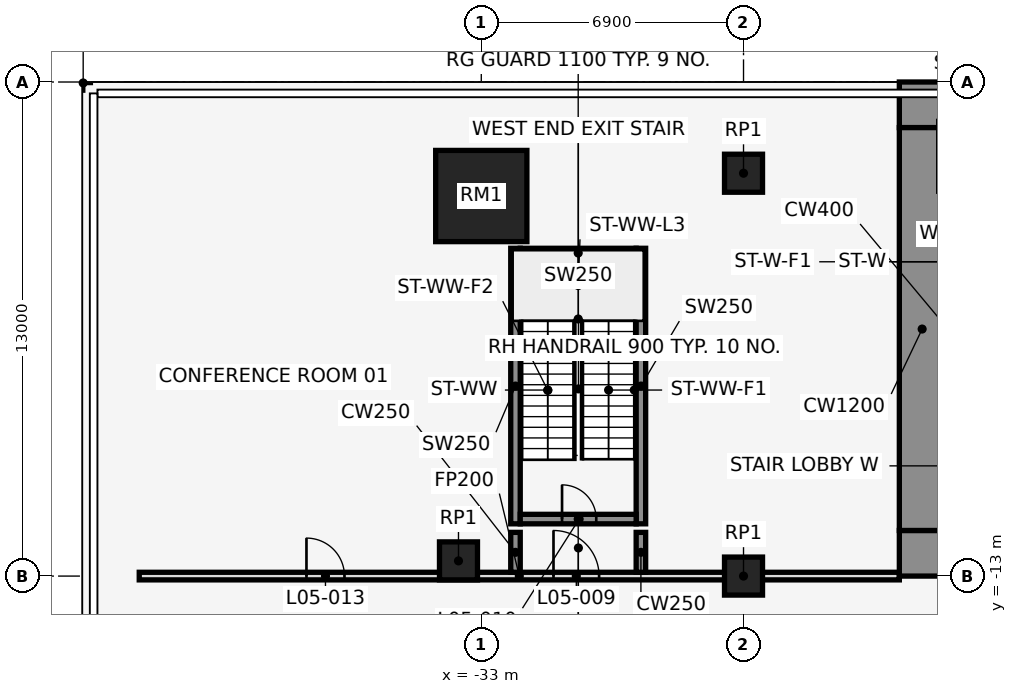
"""IFC4 building model, lengths in metres.
Left out: names, types, materials, properties, quantities, classifications, styles, units other than length and angle.
Written with IfcOpenShell. Run it as: python <this file> out.ifc"""

import sys

from ifc_helpers import new_model, si_unit, direction, frame, frame_2d, origin, origin_2d, place, context, subcontext, project, spatial, rectangle, extrude, element, fill, save


model = new_model("IFC4")
c1 = context("Model", 3, precision=1e-05, world=origin(), true_north=direction((0.0, 1.0)))
c2 = subcontext(c1, "Body", "Model", "MODEL_VIEW")
j1 = project(units=[si_unit("LENGTHUNIT", "METRE"), si_unit("PLANEANGLEUNIT", "RADIAN")], contexts=[c1])
p1 = place(None, origin())
s1 = spatial("IfcSite", under=j1, at=p1, CompositionType="ELEMENT")
p2 = place(p1, origin())
s2 = spatial("IfcBuilding", under=s1, at=p2, CompositionType="ELEMENT")
p3 = place(p2, frame((0.0, 0.0, 30.0)))
s3 = spatial("IfcBuildingStorey", under=s2, at=p3, CompositionType="ELEMENT", Elevation=30.0)
p4 = place(p3, frame((-33.0, -3.0, 0.0), z_axis=(0.0, 0.0, 1.0), x_axis=(1.0, 0.0, 0.0)))
e1 = element("IfcColumn", 1, at=p4, inside=s3, PredefinedType="COLUMN", context=c2, shape_type="SweptSolid", body=[
    extrude(rectangle(XDim=2.4, YDim=2.4, at=origin_2d()), origin(), (0.0, 0.0, 1.0), 5.0),
])
for number, where, z_axis, x_axis in (
    (2, (-26.1, -2.4, 0.0), (0.0, 0.0, 1.0), (1.0, 0.0, 0.0)),
    (3, (-33.6, -12.6, 0.0), (0.0, 0.0, 1.0), (1.0, 0.0, 0.0)),
    (4, (-26.1, -13.0, 0.0), (0.0, 0.0, 1.0), (1.0, 0.0, 0.0)),
):
    element("IfcColumn", number, at=place(p3, frame(where, z_axis=z_axis, x_axis=x_axis)), inside=s3, PredefinedType="COLUMN", context=c2, shape_type="SweptSolid", body=[
        extrude(rectangle(XDim=1.0, YDim=1.0, at=origin_2d()), origin(), (0.0, 0.0, 1.0), 5.0),
    ])
for number, where, z_axis, x_axis in (
    (5, (-32.1, -11.625, 0.0), (0.0, 0.0, 1.0), (0.0, 1.0, 0.0)),
    (6, (-28.8, -11.625, 0.0), (0.0, 0.0, 1.0), (0.0, 1.0, 0.0)),
):
    element("IfcWall", number, at=place(p3, frame(where, z_axis=z_axis, x_axis=x_axis)), inside=s3, PredefinedType="SHEAR", context=c2, shape_type="SweptSolid", body=[
        extrude(rectangle(XDim=7.25, YDim=0.25, at=frame_2d((3.625, 0.0))), origin(), (0.0, 0.0, 1.0), 5.0),
    ])
p5 = place(p3, frame((-31.975, -11.5, 0.0), z_axis=(0.0, 0.0, 1.0), x_axis=(1.0, 0.0, 0.0)))
e7 = element("IfcWall", 7, at=p5, inside=s3, PredefinedType="SHEAR", context=c2, shape_type="SweptSolid", body=[
    extrude(rectangle(XDim=3.05, YDim=0.25, at=frame_2d((1.525, 0.0))), origin(), (0.0, 0.0, 1.0), 5.0),
])
p6 = place(p5, frame((1.1, 0.0, 0.0)))
e8 = element("IfcOpeningElement", 8, at=p6, cuts=e7, PredefinedType="OPENING", context=c2, shape_type="SweptSolid", body=[
    extrude(rectangle(XDim=0.9, YDim=2.1, at=frame_2d((0.45, 1.05))), frame((0.0, 0.137, 0.0), z_axis=(0.0, -1.0, 0.0), x_axis=(1.0, 0.0, 0.0)), (0.0, 0.0, 1.0), 0.274),
])
p7 = place(p3, frame((-31.975, -4.5, 0.0), z_axis=(0.0, 0.0, 1.0), x_axis=(1.0, 0.0, 0.0)))
e9 = element("IfcWall", 9, at=p7, inside=s3, PredefinedType="SHEAR", context=c2, shape_type="SweptSolid", body=[
    extrude(rectangle(XDim=3.05, YDim=0.25, at=frame_2d((1.525, 0.0))), origin(), (0.0, 0.0, 1.0), 5.0),
])
p8 = place(p3, frame((-42.0, -13.0, 0.0), z_axis=(0.0, 0.0, 1.0), x_axis=(1.0, 0.0, 0.0)))
e10 = element("IfcWall", 10, at=p8, inside=s3, PredefinedType="PARTITIONING", context=c2, shape_type="SweptSolid", body=[
    extrude(rectangle(XDim=20.0, YDim=0.2, at=frame_2d((10.0, 0.0))), origin(), (0.0, 0.0, 1.0), 3.74),
])
p9 = place(p8, frame((10.9, 0.0, 0.0)))
e11 = element("IfcOpeningElement", 11, at=p9, cuts=e10, PredefinedType="OPENING", context=c2, shape_type="SweptSolid", body=[
    extrude(rectangle(XDim=1.2, YDim=2.1, at=frame_2d((0.6, 1.05))), frame((0.0, 0.112, 0.0), z_axis=(0.0, -1.0, 0.0), x_axis=(1.0, 0.0, 0.0)), (0.0, 0.0, 1.0), 0.224),
])
p10 = place(p8, frame((4.4, 0.0, 0.0)))
e12 = element("IfcOpeningElement", 12, at=p10, cuts=e10, PredefinedType="OPENING", context=c2, shape_type="SweptSolid", body=[
    extrude(rectangle(XDim=1.0, YDim=2.1, at=frame_2d((0.5, 1.05))), frame((0.0, 0.112, 0.0), z_axis=(0.0, -1.0, 0.0), x_axis=(1.0, 0.0, 0.0)), (0.0, 0.0, 1.0), 0.224),
])
for number, where, z_axis, x_axis in (
    (13, (-32.1, -12.9, 0.0), (0.0, 0.0, 1.0), (0.0, 1.0, 0.0)),
    (14, (-28.8, -12.9, 0.0), (0.0, 0.0, 1.0), (0.0, 1.0, 0.0)),
):
    element("IfcWall", number, at=place(p3, frame(where, z_axis=z_axis, x_axis=x_axis)), inside=s3, PredefinedType="SHEAR", context=c2, shape_type="SweptSolid", body=[
        extrude(rectangle(XDim=1.05, YDim=0.25, at=frame_2d((0.525, 0.0))), origin(), (0.0, 0.0, 1.0), 5.0),
    ])
p11 = place(p3, frame((-22.0, -0.6, 0.0), z_axis=(0.0, 0.0, 1.0), x_axis=(1.0, 0.0, 0.0)))
e15 = element("IfcWall", 15, at=p11, inside=s3, PredefinedType="SHEAR", context=c2, shape_type="SweptSolid", body=[
    extrude(rectangle(XDim=44.0, YDim=1.2, at=frame_2d((22.0, 0.0))), origin(), (0.0, 0.0, 1.0), 5.0),
])
p12 = place(p3, frame((-22.0, -12.4, 0.0), z_axis=(0.0, 0.0, 1.0), x_axis=(1.0, 0.0, 0.0)))
e16 = element("IfcWall", 16, at=p12, inside=s3, PredefinedType="SHEAR", context=c2, shape_type="SweptSolid", body=[
    extrude(rectangle(XDim=44.0, YDim=1.2, at=frame_2d((22.0, 0.0))), origin(), (0.0, 0.0, 1.0), 5.0),
])
p13 = place(p12, frame((2.2, 0.0, 0.0)))
e17 = element("IfcOpeningElement", 17, at=p13, cuts=e16, PredefinedType="OPENING", context=c2, shape_type="SweptSolid", body=[
    extrude(rectangle(XDim=1.2, YDim=2.1, at=frame_2d((0.6, 1.05))), frame((0.0, 0.612, 0.0), z_axis=(0.0, -1.0, 0.0), x_axis=(1.0, 0.0, 0.0)), (0.0, 0.0, 1.0), 1.224),
])
p14 = place(p12, frame((21.4, 0.0, 0.0)))
e18 = element("IfcOpeningElement", 18, at=p14, cuts=e16, PredefinedType="OPENING", context=c2, shape_type="SweptSolid", body=[
    extrude(rectangle(XDim=1.2, YDim=2.1, at=frame_2d((0.6, 1.05))), frame((0.0, 0.612, 0.0), z_axis=(0.0, -1.0, 0.0), x_axis=(1.0, 0.0, 0.0)), (0.0, 0.0, 1.0), 1.224),
])
p15 = place(p12, frame((40.6, 0.0, 0.0)))
e19 = element("IfcOpeningElement", 19, at=p15, cuts=e16, PredefinedType="OPENING", context=c2, shape_type="SweptSolid", body=[
    extrude(rectangle(XDim=1.2, YDim=2.1, at=frame_2d((0.6, 1.05))), frame((0.0, 0.612, 0.0), z_axis=(0.0, -1.0, 0.0), x_axis=(1.0, 0.0, 0.0)), (0.0, 0.0, 1.0), 1.224),
])
p16 = place(p12, frame((16.0, 0.0, 0.0)))
e20 = element("IfcOpeningElement", 20, at=p16, cuts=e16, PredefinedType="OPENING", context=c2, shape_type="SweptSolid", body=[
    extrude(rectangle(XDim=1.8, YDim=2.1, at=frame_2d((0.9, 1.05))), frame((0.0, 0.612, 0.0), z_axis=(0.0, -1.0, 0.0), x_axis=(1.0, 0.0, 0.0)), (0.0, 0.0, 1.0), 1.224),
])
p17 = place(p12, frame((6.3, 0.0, 0.0)))
e21 = element("IfcOpeningElement", 21, at=p17, cuts=e16, PredefinedType="OPENING", context=c2, shape_type="SweptSolid", body=[
    extrude(rectangle(XDim=1.2, YDim=2.1, at=frame_2d((0.6, 1.05))), frame((0.0, 0.612, 0.0), z_axis=(0.0, -1.0, 0.0), x_axis=(1.0, 0.0, 0.0)), (0.0, 0.0, 1.0), 1.224),
])
p18 = place(p12, frame((26.2, 0.0, 0.0)))
e22 = element("IfcOpeningElement", 22, at=p18, cuts=e16, PredefinedType="OPENING", context=c2, shape_type="SweptSolid", body=[
    extrude(rectangle(XDim=1.8, YDim=2.1, at=frame_2d((0.9, 1.05))), frame((0.0, 0.612, 0.0), z_axis=(0.0, -1.0, 0.0), x_axis=(1.0, 0.0, 0.0)), (0.0, 0.0, 1.0), 1.224),
])
p19 = place(p12, frame((36.5, 0.0, 0.0)))
e23 = element("IfcOpeningElement", 23, at=p19, cuts=e16, PredefinedType="OPENING", context=c2, shape_type="SweptSolid", body=[
    extrude(rectangle(XDim=1.2, YDim=2.1, at=frame_2d((0.6, 1.05))), frame((0.0, 0.612, 0.0), z_axis=(0.0, -1.0, 0.0), x_axis=(1.0, 0.0, 0.0)), (0.0, 0.0, 1.0), 1.224),
])
p20 = place(p3, frame((-21.4, -11.8, 0.0), z_axis=(0.0, 0.0, 1.0), x_axis=(0.0, 1.0, 0.0)))
e24 = element("IfcWall", 24, at=p20, inside=s3, PredefinedType="SHEAR", context=c2, shape_type="SweptSolid", body=[
    extrude(rectangle(XDim=10.6, YDim=1.2, at=frame_2d((5.3, 0.0))), origin(), (0.0, 0.0, 1.0), 5.0),
])
p21 = place(p9, origin())
e25 = element("IfcDoor", 25, at=p21, inside=s3, OperationType="SINGLE_SWING_RIGHT", PredefinedType="DOOR", context=c2, shape_type="SweptSolid", body=[
    extrude(rectangle(XDim=1.2, YDim=2.1, at=frame_2d((0.6, 1.05))), frame((0.0, 0.025, 0.0), z_axis=(0.0, -1.0, 0.0), x_axis=(1.0, 0.0, 0.0)), (0.0, 0.0, 1.0), 0.05),
])
fill(e11, e25)
p22 = place(p6, origin())
e26 = element("IfcDoor", 26, at=p22, inside=s3, OperationType="SINGLE_SWING_LEFT", PredefinedType="DOOR", context=c2, shape_type="SweptSolid", body=[
    extrude(rectangle(XDim=0.9, YDim=2.1, at=frame_2d((0.45, 1.05))), frame((0.0, 0.025, 0.0), z_axis=(0.0, -1.0, 0.0), x_axis=(1.0, 0.0, 0.0)), (0.0, 0.0, 1.0), 0.05),
])
fill(e8, e26)
p23 = place(p10, origin())
e27 = element("IfcDoor", 27, at=p23, inside=s3, OperationType="SINGLE_SWING_LEFT", PredefinedType="DOOR", context=c2, shape_type="SweptSolid", body=[
    extrude(rectangle(XDim=1.0, YDim=2.1, at=frame_2d((0.5, 1.05))), frame((0.0, 0.025, 0.0), z_axis=(0.0, -1.0, 0.0), x_axis=(1.0, 0.0, 0.0)), (0.0, 0.0, 1.0), 0.05),
])
fill(e12, e27)
save(model, sys.argv[1])
